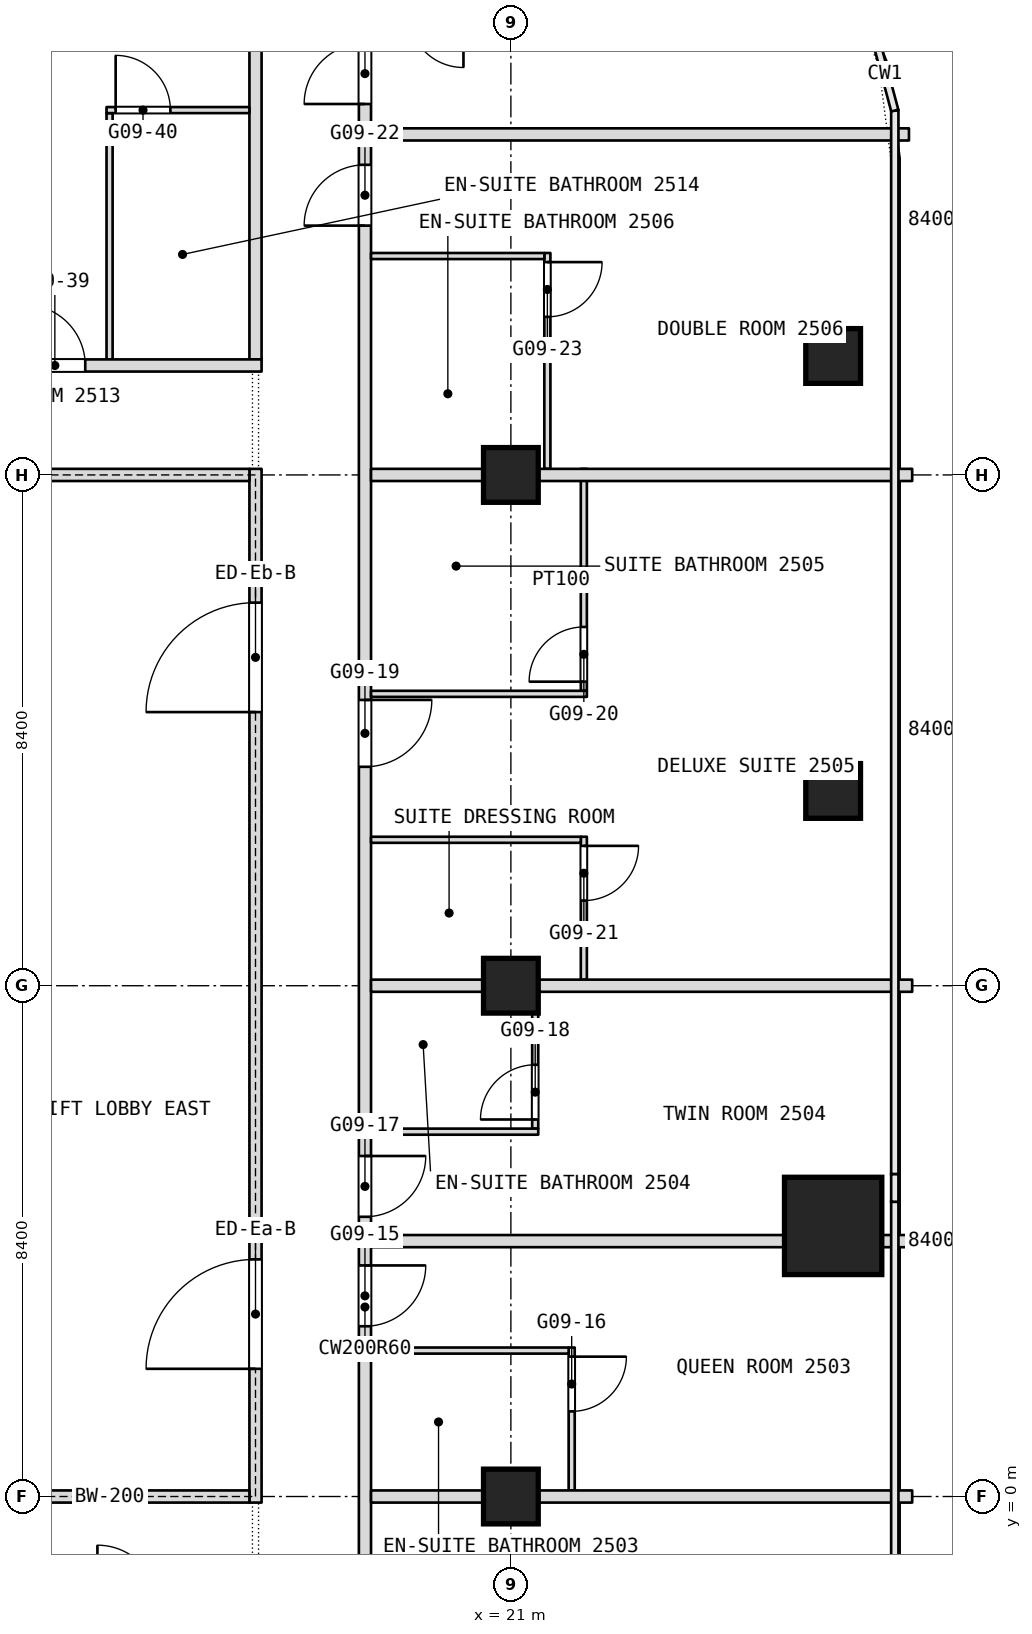
"""IFC4 building model, lengths in metres.
Left out: names, types, materials, properties, quantities, classifications, styles, units other than length and angle.
Written with IfcOpenShell. Run it as: python <this file> out.ifc"""

import sys

from ifc_helpers import new_model, si_unit, direction, frame, frame_2d, origin, origin_2d, place, context, subcontext, project, spatial, rectangle, extrude, element, fill, save


model = new_model("IFC4")
c1 = context("Model", 3, precision=1e-05, world=origin(), true_north=direction((0.0, 1.0)))
c2 = subcontext(c1, "Body", "Model", "MODEL_VIEW")
j1 = project(units=[si_unit("LENGTHUNIT", "METRE"), si_unit("PLANEANGLEUNIT", "RADIAN")], contexts=[c1])
p1 = place(None, origin())
s1 = spatial("IfcSite", under=j1, at=p1, CompositionType="ELEMENT")
p2 = place(p1, origin())
s2 = spatial("IfcBuilding", under=s1, at=p2, CompositionType="ELEMENT")
p3 = place(p2, frame((0.0, 0.0, 115.7)))
s3 = spatial("IfcBuildingStorey", under=s2, at=p3, CompositionType="ELEMENT", Elevation=115.7)
p4 = place(p3, frame((26.3, 4.45, 0.0), z_axis=(0.0, 0.0, 1.0), x_axis=(1.0, 0.0, 0.0)))
e1 = element("IfcColumn", 1, at=p4, inside=s3, PredefinedType="COLUMN", context=c2, shape_type="SweptSolid", body=[
    extrude(rectangle(XDim=1.6, YDim=1.6, at=origin_2d()), origin(), (0.0, 0.0, 1.0), 3.6),
])
for number, where, z_axis, x_axis in (
    (2, (21.0, 0.0, 0.0), (0.0, 0.0, 1.0), (1.0, 0.0, 0.0)),
    (3, (21.0, 8.4, 0.0), (0.0, 0.0, 1.0), (1.0, 0.0, 0.0)),
    (4, (21.0, 16.8, 0.0), (0.0, 0.0, 1.0), (1.0, 0.0, 0.0)),
    (5, (26.3, 18.756, 0.0), (0.0, 0.0, 1.0), (1.0, 0.0, 0.0)),
    (6, (26.3, 11.603, 0.0), (0.0, 0.0, 1.0), (1.0, 0.0, 0.0)),
):
    element("IfcColumn", number, at=place(p3, frame(where, z_axis=z_axis, x_axis=x_axis)), inside=s3, PredefinedType="COLUMN", context=c2, shape_type="SweptSolid", body=[
        extrude(rectangle(XDim=0.9, YDim=0.9, at=origin_2d()), origin(), (0.0, 0.0, 1.0), 3.6),
    ])
p5 = place(p3, frame((22.2, 8.5, 0.0), z_axis=(0.0, 0.0, 1.0), x_axis=(0.0, 1.0, 0.0)))
e7 = element("IfcWall", 7, at=p5, inside=s3, PredefinedType="PARTITIONING", context=c2, shape_type="SweptSolid", body=[
    extrude(rectangle(XDim=2.35, YDim=0.1, at=frame_2d((1.175, 0.0))), origin(), (0.0, 0.0, 1.0), 3.34),
])
p6 = place(p5, frame((1.3, 0.0, 0.0)))
e8 = element("IfcOpeningElement", 8, at=p6, cuts=e7, PredefinedType="OPENING", context=c2, shape_type="SweptSolid", body=[
    extrude(rectangle(XDim=0.9, YDim=2.1, at=frame_2d((0.45, 1.05))), frame((0.0, 0.05, 0.0), z_axis=(0.0, -1.0, 0.0), x_axis=(1.0, 0.0, 0.0)), (0.0, 0.0, 1.0), 0.1),
])
p7 = place(p3, frame((22.2, 13.25, 0.0), z_axis=(0.0, 0.0, 1.0), x_axis=(0.0, 1.0, 0.0)))
e9 = element("IfcWall", 9, at=p7, inside=s3, PredefinedType="PARTITIONING", context=c2, shape_type="SweptSolid", body=[
    extrude(rectangle(XDim=3.65, YDim=0.1, at=frame_2d((1.825, 0.0))), origin(), (0.0, 0.0, 1.0), 3.34),
])
p8 = place(p7, frame((0.15, 0.0, 0.0)))
e10 = element("IfcOpeningElement", 10, at=p8, cuts=e9, PredefinedType="OPENING", context=c2, shape_type="SweptSolid", body=[
    extrude(rectangle(XDim=0.9, YDim=2.1, at=frame_2d((0.45, 1.05))), frame((0.0, 0.05, 0.0), z_axis=(0.0, -1.0, 0.0), x_axis=(1.0, 0.0, 0.0)), (0.0, 0.0, 1.0), 0.1),
])
p9 = place(p3, frame((22.0, 0.1, 0.0), z_axis=(0.0, 0.0, 1.0), x_axis=(0.0, 1.0, 0.0)))
e11 = element("IfcWall", 11, at=p9, inside=s3, PredefinedType="PARTITIONING", context=c2, shape_type="SweptSolid", body=[
    extrude(rectangle(XDim=2.35, YDim=0.1, at=frame_2d((1.175, 0.0))), origin(), (0.0, 0.0, 1.0), 3.34),
])
p10 = place(p9, frame((1.3, 0.0, 0.0)))
e12 = element("IfcOpeningElement", 12, at=p10, cuts=e11, PredefinedType="OPENING", context=c2, shape_type="SweptSolid", body=[
    extrude(rectangle(XDim=0.9, YDim=2.1, at=frame_2d((0.45, 1.05))), frame((0.0, 0.05, 0.0), z_axis=(0.0, -1.0, 0.0), x_axis=(1.0, 0.0, 0.0)), (0.0, 0.0, 1.0), 0.1),
])
p11 = place(p3, frame((21.6, 16.9, 0.0), z_axis=(0.0, 0.0, 1.0), x_axis=(0.0, 1.0, 0.0)))
e13 = element("IfcWall", 13, at=p11, inside=s3, PredefinedType="PARTITIONING", context=c2, shape_type="SweptSolid", body=[
    extrude(rectangle(XDim=3.55, YDim=0.1, at=frame_2d((1.775, 0.0))), origin(), (0.0, 0.0, 1.0), 3.34),
])
p12 = place(p11, frame((2.5, 0.0, 0.0)))
e14 = element("IfcOpeningElement", 14, at=p12, cuts=e13, PredefinedType="OPENING", context=c2, shape_type="SweptSolid", body=[
    extrude(rectangle(XDim=0.9, YDim=2.1, at=frame_2d((0.45, 1.05))), frame((0.0, 0.05, 0.0), z_axis=(0.0, -1.0, 0.0), x_axis=(1.0, 0.0, 0.0)), (0.0, 0.0, 1.0), 0.1),
])
p13 = place(p3, frame((21.4, 6.05, 0.0), z_axis=(0.0, 0.0, 1.0), x_axis=(0.0, 1.0, 0.0)))
e15 = element("IfcWall", 15, at=p13, inside=s3, PredefinedType="PARTITIONING", context=c2, shape_type="SweptSolid", body=[
    extrude(rectangle(XDim=2.45, YDim=0.1, at=frame_2d((1.225, 0.0))), origin(), (0.0, 0.0, 1.0), 3.34),
])
p14 = place(p13, frame((0.15, 0.0, 0.0)))
e16 = element("IfcOpeningElement", 16, at=p14, cuts=e15, PredefinedType="OPENING", context=c2, shape_type="SweptSolid", body=[
    extrude(rectangle(XDim=0.9, YDim=2.1, at=frame_2d((0.45, 1.05))), frame((0.0, 0.05, 0.0), z_axis=(0.0, -1.0, 0.0), x_axis=(1.0, 0.0, 0.0)), (0.0, 0.0, 1.0), 0.1),
])
p15 = place(p3, frame((18.6, -21.708, 0.0), z_axis=(0.0, 0.0, 1.0), x_axis=(0.0, 1.0, 0.0)))
e17 = element("IfcWall", 17, at=p15, inside=s3, PredefinedType="PARTITIONING", context=c2, shape_type="SweptSolid", body=[
    extrude(rectangle(XDim=49.648, YDim=0.2, at=frame_2d((24.824, 0.0))), origin(), (0.0, 0.0, 1.0), 3.34),
])
p16 = place(p15, frame((2.8, 0.0, 0.0)))
e18 = element("IfcOpeningElement", 18, at=p16, cuts=e17, PredefinedType="OPENING", context=c2, shape_type="SweptSolid", body=[
    extrude(rectangle(XDim=1.0, YDim=2.1, at=frame_2d((0.5, 1.05))), frame((0.0, 0.1, 0.0), z_axis=(0.0, -1.0, 0.0), x_axis=(1.0, 0.0, 0.0)), (0.0, 0.0, 1.0), 0.2),
])
p17 = place(p15, frame((10.658, 0.0, 0.0)))
e19 = element("IfcOpeningElement", 19, at=p17, cuts=e17, PredefinedType="OPENING", context=c2, shape_type="SweptSolid", body=[
    extrude(rectangle(XDim=1.1, YDim=2.1, at=frame_2d((0.55, 1.05))), frame((0.0, 0.1, 0.0), z_axis=(0.0, -1.0, 0.0), x_axis=(1.0, 0.0, 0.0)), (0.0, 0.0, 1.0), 0.2),
])
p18 = place(p15, frame((16.608, 0.0, 0.0)))
e20 = element("IfcOpeningElement", 20, at=p18, cuts=e17, PredefinedType="OPENING", context=c2, shape_type="SweptSolid", body=[
    extrude(rectangle(XDim=1.8, YDim=2.1, at=frame_2d((0.9, 1.05))), frame((0.0, 0.1, 0.0), z_axis=(0.0, -1.0, 0.0), x_axis=(1.0, 0.0, 0.0)), (0.0, 0.0, 1.0), 0.2),
])
p19 = place(p15, frame((24.508, 0.0, 0.0)))
e21 = element("IfcOpeningElement", 21, at=p19, cuts=e17, PredefinedType="OPENING", context=c2, shape_type="SweptSolid", body=[
    extrude(rectangle(XDim=1.0, YDim=2.1, at=frame_2d((0.5, 1.05))), frame((0.0, 0.1, 0.0), z_axis=(0.0, -1.0, 0.0), x_axis=(1.0, 0.0, 0.0)), (0.0, 0.0, 1.0), 0.2),
])
p20 = place(p15, frame((26.308, 0.0, 0.0)))
e22 = element("IfcOpeningElement", 22, at=p20, cuts=e17, PredefinedType="OPENING", context=c2, shape_type="SweptSolid", body=[
    extrude(rectangle(XDim=1.0, YDim=2.1, at=frame_2d((0.5, 1.05))), frame((0.0, 0.1, 0.0), z_axis=(0.0, -1.0, 0.0), x_axis=(1.0, 0.0, 0.0)), (0.0, 0.0, 1.0), 0.2),
])
p21 = place(p15, frame((33.708, 0.0, 0.0)))
e23 = element("IfcOpeningElement", 23, at=p21, cuts=e17, PredefinedType="OPENING", context=c2, shape_type="SweptSolid", body=[
    extrude(rectangle(XDim=1.1, YDim=2.1, at=frame_2d((0.55, 1.05))), frame((0.0, 0.1, 0.0), z_axis=(0.0, -1.0, 0.0), x_axis=(1.0, 0.0, 0.0)), (0.0, 0.0, 1.0), 0.2),
])
p22 = place(p15, frame((42.608, 0.0, 0.0)))
e24 = element("IfcOpeningElement", 24, at=p22, cuts=e17, PredefinedType="OPENING", context=c2, shape_type="SweptSolid", body=[
    extrude(rectangle(XDim=1.0, YDim=2.1, at=frame_2d((0.5, 1.05))), frame((0.0, 0.1, 0.0), z_axis=(0.0, -1.0, 0.0), x_axis=(1.0, 0.0, 0.0)), (0.0, 0.0, 1.0), 0.2),
])
p23 = place(p15, frame((44.608, 0.0, 0.0)))
e25 = element("IfcOpeningElement", 25, at=p23, cuts=e17, PredefinedType="OPENING", context=c2, shape_type="SweptSolid", body=[
    extrude(rectangle(XDim=1.0, YDim=2.1, at=frame_2d((0.5, 1.05))), frame((0.0, 0.1, 0.0), z_axis=(0.0, -1.0, 0.0), x_axis=(1.0, 0.0, 0.0)), (0.0, 0.0, 1.0), 0.2),
])
p24 = place(p3, frame((16.8, 18.7, 0.0), z_axis=(0.0, 0.0, 1.0), x_axis=(0.0, 1.0, 0.0)))
e26 = element("IfcWall", 26, at=p24, inside=s3, PredefinedType="PARTITIONING", context=c2, shape_type="SweptSolid", body=[
    extrude(rectangle(XDim=9.24, YDim=0.2, at=frame_2d((4.62, 0.0))), origin(), (0.0, 0.0, 1.0), 3.34),
])
p25 = place(p3, frame((14.4, 18.7, 0.0), z_axis=(0.0, 0.0, 1.0), x_axis=(0.0, 1.0, 0.0)))
e27 = element("IfcWall", 27, at=p25, inside=s3, PredefinedType="PARTITIONING", context=c2, shape_type="SweptSolid", body=[
    extrude(rectangle(XDim=4.05, YDim=0.1, at=frame_2d((2.025, 0.0))), origin(), (0.0, 0.0, 1.0), 3.34),
])
p26 = place(p3, frame((18.7, 0.0, 0.0), z_axis=(0.0, 0.0, 1.0), x_axis=(1.0, 0.0, 0.0)))
e28 = element("IfcWall", 28, at=p26, inside=s3, PredefinedType="PARTITIONING", context=c2, shape_type="SweptSolid", body=[
    extrude(rectangle(XDim=8.9, YDim=0.2, at=frame_2d((4.45, 0.0))), origin(), (0.0, 0.0, 1.0), 2.89),
])
p27 = place(p3, frame((18.7, 2.4, 0.0), z_axis=(0.0, 0.0, 1.0), x_axis=(1.0, 0.0, 0.0)))
e29 = element("IfcWall", 29, at=p27, inside=s3, PredefinedType="PARTITIONING", context=c2, shape_type="SweptSolid", body=[
    extrude(rectangle(XDim=3.25, YDim=0.1, at=frame_2d((1.625, 0.0))), origin(), (0.0, 0.0, 1.0), 3.34),
])
p28 = place(p3, frame((18.7, 4.2, 0.0), z_axis=(0.0, 0.0, 1.0), x_axis=(1.0, 0.0, 0.0)))
e30 = element("IfcWall", 30, at=p28, inside=s3, PredefinedType="PARTITIONING", context=c2, shape_type="SweptSolid", body=[
    extrude(rectangle(XDim=6.8, YDim=0.2, at=frame_2d((3.4, 0.0))), origin(), (0.0, 0.0, 1.0), 3.34),
])
p29 = place(p3, frame((27.1, 4.2, 0.0), z_axis=(0.0, 0.0, 1.0), x_axis=(1.0, 0.0, 0.0)))
e31 = element("IfcWall", 31, at=p29, inside=s3, PredefinedType="PARTITIONING", context=c2, shape_type="SweptSolid", body=[
    extrude(rectangle(XDim=0.5, YDim=0.2, at=frame_2d((0.25, 0.0))), origin(), (0.0, 0.0, 1.0), 3.34),
])
p30 = place(p3, frame((18.7, 6.0, 0.0), z_axis=(0.0, 0.0, 1.0), x_axis=(1.0, 0.0, 0.0)))
e32 = element("IfcWall", 32, at=p30, inside=s3, PredefinedType="PARTITIONING", context=c2, shape_type="SweptSolid", body=[
    extrude(rectangle(XDim=2.75, YDim=0.1, at=frame_2d((1.375, 0.0))), origin(), (0.0, 0.0, 1.0), 3.34),
])
p31 = place(p3, frame((18.7, 8.4, 0.0), z_axis=(0.0, 0.0, 1.0), x_axis=(1.0, 0.0, 0.0)))
e33 = element("IfcWall", 33, at=p31, inside=s3, PredefinedType="PARTITIONING", context=c2, shape_type="SweptSolid", body=[
    extrude(rectangle(XDim=8.9, YDim=0.2, at=frame_2d((4.45, 0.0))), origin(), (0.0, 0.0, 1.0), 2.89),
])
p32 = place(p3, frame((18.7, 10.8, 0.0), z_axis=(0.0, 0.0, 1.0), x_axis=(1.0, 0.0, 0.0)))
e34 = element("IfcWall", 34, at=p32, inside=s3, PredefinedType="PARTITIONING", context=c2, shape_type="SweptSolid", body=[
    extrude(rectangle(XDim=3.45, YDim=0.1, at=frame_2d((1.725, 0.0))), origin(), (0.0, 0.0, 1.0), 3.34),
])
p33 = place(p3, frame((18.7, 13.2, 0.0), z_axis=(0.0, 0.0, 1.0), x_axis=(1.0, 0.0, 0.0)))
e35 = element("IfcWall", 35, at=p33, inside=s3, PredefinedType="PARTITIONING", context=c2, shape_type="SweptSolid", body=[
    extrude(rectangle(XDim=3.55, YDim=0.1, at=frame_2d((1.775, 0.0))), origin(), (0.0, 0.0, 1.0), 3.34),
])
p34 = place(p3, frame((18.7, 16.8, 0.0), z_axis=(0.0, 0.0, 1.0), x_axis=(1.0, 0.0, 0.0)))
e36 = element("IfcWall", 36, at=p34, inside=s3, PredefinedType="PARTITIONING", context=c2, shape_type="SweptSolid", body=[
    extrude(rectangle(XDim=8.9, YDim=0.2, at=frame_2d((4.45, 0.0))), origin(), (0.0, 0.0, 1.0), 2.89),
])
p35 = place(p3, frame((10.7, 18.6, 0.0), z_axis=(0.0, 0.0, 1.0), x_axis=(1.0, 0.0, 0.0)))
e37 = element("IfcWall", 37, at=p35, inside=s3, PredefinedType="PARTITIONING", context=c2, shape_type="SweptSolid", body=[
    extrude(rectangle(XDim=6.2, YDim=0.2, at=frame_2d((3.1, 0.0))), origin(), (0.0, 0.0, 1.0), 3.34),
])
p36 = place(p35, frame((2.3, 0.0, 0.0)))
e38 = element("IfcOpeningElement", 38, at=p36, cuts=e37, PredefinedType="OPENING", context=c2, shape_type="SweptSolid", body=[
    extrude(rectangle(XDim=1.0, YDim=2.1, at=frame_2d((0.5, 1.05))), frame((0.0, 0.1, 0.0), z_axis=(0.0, -1.0, 0.0), x_axis=(1.0, 0.0, 0.0)), (0.0, 0.0, 1.0), 0.2),
])
p37 = place(p3, frame((18.7, 20.4, 0.0), z_axis=(0.0, 0.0, 1.0), x_axis=(1.0, 0.0, 0.0)))
e39 = element("IfcWall", 39, at=p37, inside=s3, PredefinedType="PARTITIONING", context=c2, shape_type="SweptSolid", body=[
    extrude(rectangle(XDim=2.85, YDim=0.1, at=frame_2d((1.425, 0.0))), origin(), (0.0, 0.0, 1.0), 3.34),
])
p38 = place(p3, frame((18.7, 22.4, 0.0), z_axis=(0.0, 0.0, 1.0), x_axis=(1.0, 0.0, 0.0)))
e40 = element("IfcWall", 40, at=p38, inside=s3, PredefinedType="PARTITIONING", context=c2, shape_type="SweptSolid", body=[
    extrude(rectangle(XDim=8.847, YDim=0.2, at=frame_2d((4.424, 0.0))), origin(), (0.0, 0.0, 1.0), 3.34),
])
p39 = place(p3, frame((14.35, 22.8, 0.0), z_axis=(0.0, 0.0, 1.0), x_axis=(1.0, 0.0, 0.0)))
e41 = element("IfcWall", 41, at=p39, inside=s3, PredefinedType="PARTITIONING", context=c2, shape_type="SweptSolid", body=[
    extrude(rectangle(XDim=2.35, YDim=0.1, at=frame_2d((1.175, 0.0))), origin(), (0.0, 0.0, 1.0), 3.34),
])
p40 = place(p39, frame((0.15, 0.0, 0.0)))
e42 = element("IfcOpeningElement", 42, at=p40, cuts=e41, PredefinedType="OPENING", context=c2, shape_type="SweptSolid", body=[
    extrude(rectangle(XDim=0.9, YDim=2.1, at=frame_2d((0.45, 1.05))), frame((0.0, 0.05, 0.0), z_axis=(0.0, -1.0, 0.0), x_axis=(1.0, 0.0, 0.0)), (0.0, 0.0, 1.0), 0.1),
])
p41 = place(p3, frame((16.8, -0.1, 0.0), z_axis=(0.0, 0.0, 1.0), x_axis=(0.0, 1.0, 0.0)))
e43 = element("IfcWall", 43, at=p41, inside=s3, PredefinedType="PARTITIONING", context=c2, shape_type="SweptSolid", body=[
    extrude(rectangle(XDim=17.0, YDim=0.2, at=frame_2d((8.5, 0.0))), origin(), (0.0, 0.0, 1.0), 3.34),
])
p42 = place(p41, frame((2.2, 0.0, 0.0)))
e44 = element("IfcOpeningElement", 44, at=p42, cuts=e43, PredefinedType="OPENING", context=c2, shape_type="SweptSolid", body=[
    extrude(rectangle(XDim=1.8, YDim=2.1, at=frame_2d((0.9, 1.05))), frame((0.0, 0.1, 0.0), z_axis=(0.0, -1.0, 0.0), x_axis=(1.0, 0.0, 0.0)), (0.0, 0.0, 1.0), 0.2),
])
p43 = place(p41, frame((13.0, 0.0, 0.0)))
e45 = element("IfcOpeningElement", 45, at=p43, cuts=e43, PredefinedType="OPENING", context=c2, shape_type="SweptSolid", body=[
    extrude(rectangle(XDim=1.8, YDim=2.1, at=frame_2d((0.9, 1.05))), frame((0.0, 0.1, 0.0), z_axis=(0.0, -1.0, 0.0), x_axis=(1.0, 0.0, 0.0)), (0.0, 0.0, 1.0), 0.2),
])
for number, where, z_axis, x_axis in (
    (46, (12.1, 0.0, 0.0), (0.0, 0.0, 1.0), (1.0, 0.0, 0.0)),
    (47, (12.1, 16.8, 0.0), (0.0, 0.0, 1.0), (1.0, 0.0, 0.0)),
):
    element("IfcWall", number, at=place(p3, frame(where, z_axis=z_axis, x_axis=x_axis)), inside=s3, PredefinedType="PARTITIONING", context=c2, shape_type="SweptSolid", body=[
        extrude(rectangle(XDim=4.6, YDim=0.2, at=frame_2d((2.3, 0.0))), origin(), (0.0, 0.0, 1.0), 2.89),
    ])
p44 = place(p6, origin())
e48 = element("IfcDoor", 48, at=p44, inside=s3, OperationType="SINGLE_SWING_RIGHT", PredefinedType="DOOR", context=c2, shape_type="SweptSolid", body=[
    extrude(rectangle(XDim=0.9, YDim=2.1, at=frame_2d((0.45, 1.05))), frame((0.0, 0.025, 0.0), z_axis=(0.0, -1.0, 0.0), x_axis=(1.0, 0.0, 0.0)), (0.0, 0.0, 1.0), 0.05),
])
fill(e8, e48)
p45 = place(p8, origin())
e49 = element("IfcDoor", 49, at=p45, inside=s3, OperationType="SINGLE_SWING_LEFT", PredefinedType="DOOR", context=c2, shape_type="SweptSolid", body=[
    extrude(rectangle(XDim=0.9, YDim=2.1, at=frame_2d((0.45, 1.05))), frame((0.0, 0.025, 0.0), z_axis=(0.0, -1.0, 0.0), x_axis=(1.0, 0.0, 0.0)), (0.0, 0.0, 1.0), 0.05),
])
fill(e10, e49)
p46 = place(p10, origin())
e50 = element("IfcDoor", 50, at=p46, inside=s3, OperationType="SINGLE_SWING_RIGHT", PredefinedType="DOOR", context=c2, shape_type="SweptSolid", body=[
    extrude(rectangle(XDim=0.9, YDim=2.1, at=frame_2d((0.45, 1.05))), frame((0.0, 0.025, 0.0), z_axis=(0.0, -1.0, 0.0), x_axis=(1.0, 0.0, 0.0)), (0.0, 0.0, 1.0), 0.05),
])
fill(e12, e50)
p47 = place(p12, origin())
e51 = element("IfcDoor", 51, at=p47, inside=s3, OperationType="SINGLE_SWING_RIGHT", PredefinedType="DOOR", context=c2, shape_type="SweptSolid", body=[
    extrude(rectangle(XDim=0.9, YDim=2.1, at=frame_2d((0.45, 1.05))), frame((0.0, 0.025, 0.0), z_axis=(0.0, -1.0, 0.0), x_axis=(1.0, 0.0, 0.0)), (0.0, 0.0, 1.0), 0.05),
])
fill(e14, e51)
p48 = place(p14, origin())
e52 = element("IfcDoor", 52, at=p48, inside=s3, OperationType="SINGLE_SWING_LEFT", PredefinedType="DOOR", context=c2, shape_type="SweptSolid", body=[
    extrude(rectangle(XDim=0.9, YDim=2.1, at=frame_2d((0.45, 1.05))), frame((0.0, 0.025, 0.0), z_axis=(0.0, -1.0, 0.0), x_axis=(1.0, 0.0, 0.0)), (0.0, 0.0, 1.0), 0.05),
])
fill(e16, e52)
p49 = place(p19, origin())
e53 = element("IfcDoor", 53, at=p49, inside=s3, OperationType="SINGLE_SWING_LEFT", PredefinedType="DOOR", context=c2, shape_type="SweptSolid", body=[
    extrude(rectangle(XDim=1.0, YDim=2.1, at=frame_2d((0.5, 1.05))), frame((0.0, 0.025, 0.0), z_axis=(0.0, -1.0, 0.0), x_axis=(1.0, 0.0, 0.0)), (0.0, 0.0, 1.0), 0.05),
])
fill(e21, e53)
p50 = place(p20, origin())
e54 = element("IfcDoor", 54, at=p50, inside=s3, OperationType="SINGLE_SWING_LEFT", PredefinedType="DOOR", context=c2, shape_type="SweptSolid", body=[
    extrude(rectangle(XDim=1.0, YDim=2.1, at=frame_2d((0.5, 1.05))), frame((0.0, 0.025, 0.0), z_axis=(0.0, -1.0, 0.0), x_axis=(1.0, 0.0, 0.0)), (0.0, 0.0, 1.0), 0.05),
])
fill(e22, e54)
p51 = place(p21, origin())
e55 = element("IfcDoor", 55, at=p51, inside=s3, OperationType="SINGLE_SWING_LEFT", PredefinedType="DOOR", context=c2, shape_type="SweptSolid", body=[
    extrude(rectangle(XDim=1.1, YDim=2.1, at=frame_2d((0.55, 1.05))), frame((0.0, 0.025, 0.0), z_axis=(0.0, -1.0, 0.0), x_axis=(1.0, 0.0, 0.0)), (0.0, 0.0, 1.0), 0.05),
])
fill(e23, e55)
p52 = place(p22, origin())
e56 = element("IfcDoor", 56, at=p52, inside=s3, OperationType="SINGLE_SWING_RIGHT", PredefinedType="DOOR", context=c2, shape_type="SweptSolid", body=[
    extrude(rectangle(XDim=1.0, YDim=2.1, at=frame_2d((0.5, 1.05))), frame((0.0, 0.025, 0.0), z_axis=(0.0, -1.0, 0.0), x_axis=(1.0, 0.0, 0.0)), (0.0, 0.0, 1.0), 0.05),
])
fill(e24, e56)
p53 = place(p23, origin())
e57 = element("IfcDoor", 57, at=p53, inside=s3, OperationType="SINGLE_SWING_RIGHT", PredefinedType="DOOR", context=c2, shape_type="SweptSolid", body=[
    extrude(rectangle(XDim=1.0, YDim=2.1, at=frame_2d((0.5, 1.05))), frame((0.0, 0.025, 0.0), z_axis=(0.0, -1.0, 0.0), x_axis=(1.0, 0.0, 0.0)), (0.0, 0.0, 1.0), 0.05),
])
fill(e25, e57)
p54 = place(p36, origin())
e58 = element("IfcDoor", 58, at=p54, inside=s3, OperationType="SINGLE_SWING_RIGHT", PredefinedType="DOOR", context=c2, shape_type="SweptSolid", body=[
    extrude(rectangle(XDim=1.0, YDim=2.1, at=frame_2d((0.5, 1.05))), frame((0.0, 0.025, 0.0), z_axis=(0.0, -1.0, 0.0), x_axis=(1.0, 0.0, 0.0)), (0.0, 0.0, 1.0), 0.05),
])
fill(e38, e58)
p55 = place(p40, origin())
e59 = element("IfcDoor", 59, at=p55, inside=s3, OperationType="SINGLE_SWING_RIGHT", PredefinedType="DOOR", context=c2, shape_type="SweptSolid", body=[
    extrude(rectangle(XDim=0.9, YDim=2.1, at=frame_2d((0.45, 1.05))), frame((0.0, 0.025, 0.0), z_axis=(0.0, -1.0, 0.0), x_axis=(1.0, 0.0, 0.0)), (0.0, 0.0, 1.0), 0.05),
])
fill(e42, e59)
p56 = place(p42, origin())
e60 = element("IfcDoor", 60, at=p56, inside=s3, OperationType="DOUBLE_DOOR_SINGLE_SWING", PredefinedType="DOOR", context=c2, shape_type="SweptSolid", body=[
    extrude(rectangle(XDim=1.8, YDim=2.1, at=frame_2d((0.9, 1.05))), frame((0.0, 0.025, 0.0), z_axis=(0.0, -1.0, 0.0), x_axis=(1.0, 0.0, 0.0)), (0.0, 0.0, 1.0), 0.05),
])
fill(e44, e60)
p57 = place(p43, origin())
e61 = element("IfcDoor", 61, at=p57, inside=s3, OperationType="DOUBLE_DOOR_SINGLE_SWING", PredefinedType="DOOR", context=c2, shape_type="SweptSolid", body=[
    extrude(rectangle(XDim=1.8, YDim=2.1, at=frame_2d((0.9, 1.05))), frame((0.0, 0.025, 0.0), z_axis=(0.0, -1.0, 0.0), x_axis=(1.0, 0.0, 0.0)), (0.0, 0.0, 1.0), 0.05),
])
fill(e45, e61)
save(model, sys.argv[1])
